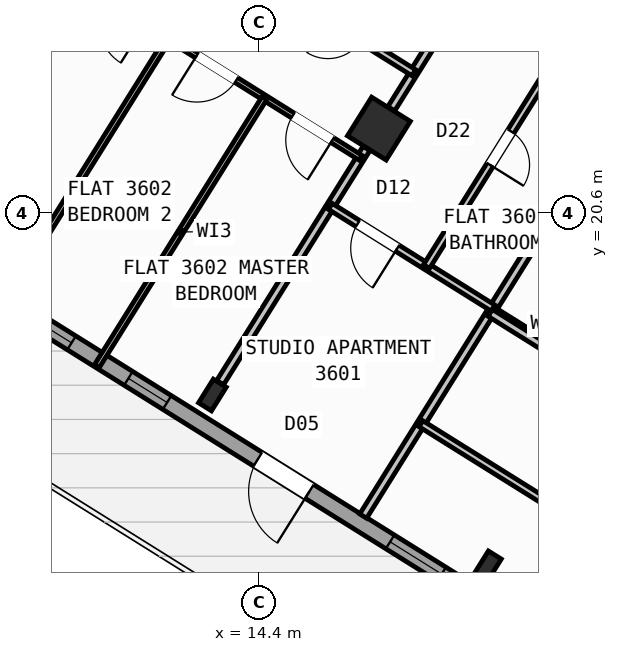
"""IFC4 building model, lengths in metres.
Left out: names, types, materials, properties, quantities, classifications, styles, units other than length and angle.
Written with IfcOpenShell. Run it as: python <this file> out.ifc"""

import sys

from ifc_helpers import new_model, si_unit, direction, frame, frame_2d, origin, origin_2d, place, context, subcontext, project, spatial, rectangle, hollow_rectangle, i_section, extrude, source, transform, mapped, element, fill, save


model = new_model("IFC4")
c1 = context("Model", 3, precision=1e-05, world=origin(), true_north=direction((0.0, 1.0)))
c2 = subcontext(c1, "Body", "Model", "MODEL_VIEW")
j1 = project(units=[si_unit("LENGTHUNIT", "METRE"), si_unit("PLANEANGLEUNIT", "RADIAN")], contexts=[c1])
p1 = place(None, origin())
s1 = spatial("IfcSite", under=j1, at=p1, CompositionType="ELEMENT")
p2 = place(p1, origin())
s2 = spatial("IfcBuilding", under=s1, at=p2, CompositionType="ELEMENT")
p3 = place(p2, frame((0.0, 0.0, 144.3)))
s3 = spatial("IfcBuildingStorey", under=s2, at=p3, CompositionType="ELEMENT", Elevation=144.3)
m1 = source(origin(), c2, "Body", "SweptSolid", [
    extrude(i_section(OverallWidth=0.3, OverallDepth=0.55, WebThickness=0.015, FlangeThickness=0.029, at=origin_2d()), origin(), (0.0, 0.0, 1.0), 3.6),
])
p4 = place(p3, frame((18.906, 13.612, 0.0), z_axis=(0.0, 0.0, 1.0), x_axis=(-0.848048096156, 0.529919264233, 0.0)))
e1 = element("IfcColumn", 1, at=p4, inside=s3, PredefinedType="COLUMN", context=c2, shape_type="MappedRepresentation", body=[
    mapped(m1, transform((0.0, 0.0, 0.0), scale=1.0)),
])
m2 = source(origin(), c2, "Body", "SweptSolid", [
    extrude(hollow_rectangle(XDim=0.9, YDim=0.9, WallThickness=0.036, at=origin_2d()), origin(), (0.0, 0.0, 1.0), 3.6),
])
p5 = place(p3, frame((16.764, 22.261, 0.0), z_axis=(0.0, 0.0, 1.0), x_axis=(-0.848048096156, 0.529919264233, 0.0)))
e2 = element("IfcColumn", 2, at=p5, inside=s3, PredefinedType="COLUMN", context=c2, shape_type="MappedRepresentation", body=[
    mapped(m2, transform((0.0, 0.0, 0.0), scale=1.0)),
])
p6 = place(p3, frame((13.478, 17.003, 0.0), z_axis=(0.0, 0.0, 1.0), x_axis=(-0.848048096156, 0.529919264233, 0.0)))
e3 = element("IfcColumn", 3, at=p6, inside=s3, PredefinedType="COLUMN", context=c2, shape_type="MappedRepresentation", body=[
    mapped(m1, transform((0.0, 0.0, 0.0), scale=1.0)),
])
p7 = place(p3, frame((29.268, 6.429, 0.0), z_axis=(0.0, 0.0, 1.0), x_axis=(-0.848049971435, 0.529916263149, 0.0)))
e4 = element("IfcWall", 4, at=p7, inside=s3, PredefinedType="STANDARD", context=c2, shape_type="SweptSolid", body=[
    extrude(rectangle(XDim=31.588, YDim=0.32, at=frame_2d((15.794, 0.0))), origin(), (0.0, 0.0, 1.0), 3.35),
])
p8 = place(p7, frame((16.362, 0.0, 0.0)))
e5 = element("IfcOpeningElement", 5, at=p8, cuts=e4, PredefinedType="OPENING", context=c2, shape_type="SweptSolid", body=[
    extrude(rectangle(XDim=1.2, YDim=2.15, at=frame_2d((0.6, 1.075))), frame((0.0, 0.17, 0.0), z_axis=(0.0, -1.0, 0.0), x_axis=(1.0, 0.0, 0.0)), (0.0, 0.0, 1.0), 0.34),
])
p9 = place(p7, frame((2.989, 0.0, 0.8)))
e6 = element("IfcOpeningElement", 6, at=p9, cuts=e4, PredefinedType="OPENING", context=c2, shape_type="SweptSolid", body=[
    extrude(rectangle(XDim=2.1, YDim=1.55, at=frame_2d((1.05, 0.775))), frame((0.0, 0.17, 0.0), z_axis=(0.0, -1.0, 0.0), x_axis=(1.0, 0.0, 0.0)), (0.0, 0.0, 1.0), 0.34),
])
p10 = place(p7, frame((8.359, 0.0, 0.8)))
e7 = element("IfcOpeningElement", 7, at=p10, cuts=e4, PredefinedType="OPENING", context=c2, shape_type="SweptSolid", body=[
    extrude(rectangle(XDim=2.1, YDim=1.55, at=frame_2d((1.05, 0.775))), frame((0.0, 0.17, 0.0), z_axis=(0.0, -1.0, 0.0), x_axis=(1.0, 0.0, 0.0)), (0.0, 0.0, 1.0), 0.34),
])
p11 = place(p7, frame((13.284, 0.0, 0.95)))
e8 = element("IfcOpeningElement", 8, at=p11, cuts=e4, PredefinedType="OPENING", context=c2, shape_type="SweptSolid", body=[
    extrude(rectangle(XDim=1.2, YDim=1.4, at=frame_2d((0.6, 0.7))), frame((0.0, 0.17, 0.0), z_axis=(0.0, -1.0, 0.0), x_axis=(1.0, 0.0, 0.0)), (0.0, 0.0, 1.0), 0.34),
])
p12 = place(p7, frame((29.188, 0.0, 0.95)))
e9 = element("IfcOpeningElement", 9, at=p12, cuts=e4, PredefinedType="OPENING", context=c2, shape_type="SweptSolid", body=[
    extrude(rectangle(XDim=1.2, YDim=1.4, at=frame_2d((0.6, 0.7))), frame((0.0, 0.17, 0.0), z_axis=(0.0, -1.0, 0.0), x_axis=(1.0, 0.0, 0.0)), (0.0, 0.0, 1.0), 0.34),
])
p13 = place(p7, frame((19.674, 0.0, 1.0)))
e10 = element("IfcOpeningElement", 10, at=p13, cuts=e4, PredefinedType="OPENING", context=c2, shape_type="SweptSolid", body=[
    extrude(rectangle(XDim=0.9, YDim=1.25, at=frame_2d((0.45, 0.625))), frame((0.0, 0.17, 0.0), z_axis=(0.0, -1.0, 0.0), x_axis=(1.0, 0.0, 0.0)), (0.0, 0.0, 1.0), 0.34),
])
p14 = place(p7, frame((21.896, 0.0, 1.0)))
e11 = element("IfcOpeningElement", 11, at=p14, cuts=e4, PredefinedType="OPENING", context=c2, shape_type="SweptSolid", body=[
    extrude(rectangle(XDim=0.9, YDim=1.25, at=frame_2d((0.45, 0.625))), frame((0.0, 0.17, 0.0), z_axis=(0.0, -1.0, 0.0), x_axis=(1.0, 0.0, 0.0)), (0.0, 0.0, 1.0), 0.34),
])
p15 = place(p7, frame((24.106, 0.0, 1.0)))
e12 = element("IfcOpeningElement", 12, at=p15, cuts=e4, PredefinedType="OPENING", context=c2, shape_type="SweptSolid", body=[
    extrude(rectangle(XDim=0.65, YDim=1.15, at=frame_2d((0.325, 0.575))), frame((0.0, 0.17, 0.0), z_axis=(0.0, -1.0, 0.0), x_axis=(1.0, 0.0, 0.0)), (0.0, 0.0, 1.0), 0.34),
])
p16 = place(p7, frame((26.366, 0.0, 1.0)))
e13 = element("IfcOpeningElement", 13, at=p16, cuts=e4, PredefinedType="OPENING", context=c2, shape_type="SweptSolid", body=[
    extrude(rectangle(XDim=0.9, YDim=1.25, at=frame_2d((0.45, 0.625))), frame((0.0, 0.17, 0.0), z_axis=(0.0, -1.0, 0.0), x_axis=(1.0, 0.0, 0.0)), (0.0, 0.0, 1.0), 0.34),
])
p17 = place(p3, frame((2.415, 23.452, 0.0), z_axis=(0.0, 0.0, 1.0), x_axis=(0.52991049553, 0.848053575387, 0.0)))
e14 = element("IfcWall", 14, at=p17, inside=s3, PredefinedType="STANDARD", context=c2, shape_type="SweptSolid", body=[
    extrude(rectangle(XDim=21.587, YDim=0.32, at=frame_2d((10.794, 0.0))), origin(), (0.0, 0.0, 1.0), 2.775),
])
p18 = place(p17, frame((2.356, 0.0, 0.8)))
e15 = element("IfcOpeningElement", 15, at=p18, cuts=e14, PredefinedType="OPENING", context=c2, shape_type="SweptSolid", body=[
    extrude(rectangle(XDim=2.1, YDim=1.55, at=frame_2d((1.05, 0.775))), frame((0.0, 0.17, 0.0), z_axis=(0.0, -1.0, 0.0), x_axis=(1.0, 0.0, 0.0)), (0.0, 0.0, 1.0), 0.34),
])
p19 = place(p17, frame((8.639, 0.0, 1.0)))
e16 = element("IfcOpeningElement", 16, at=p19, cuts=e14, PredefinedType="OPENING", context=c2, shape_type="SweptSolid", body=[
    extrude(rectangle(XDim=0.9, YDim=1.25, at=frame_2d((0.45, 0.625))), frame((0.0, 0.17, 0.0), z_axis=(0.0, -1.0, 0.0), x_axis=(1.0, 0.0, 0.0)), (0.0, 0.0, 1.0), 0.34),
])
p20 = place(p17, frame((17.744, 0.0, 0.85)))
e17 = element("IfcOpeningElement", 17, at=p20, cuts=e14, PredefinedType="OPENING", context=c2, shape_type="SweptSolid", body=[
    extrude(rectangle(XDim=1.5, YDim=1.5, at=frame_2d((0.75, 0.75))), frame((0.0, 0.17, 0.0), z_axis=(0.0, -1.0, 0.0), x_axis=(1.0, 0.0, 0.0)), (0.0, 0.0, 1.0), 0.34),
])
p21 = place(p3, frame((21.206, 17.292, 0.0), z_axis=(0.0, 0.0, 1.0), x_axis=(-0.848050851465, 0.529914854792, 0.0)))
e18 = element("IfcWall", 18, at=p21, inside=s3, PredefinedType="PARTITIONING", context=c2, shape_type="SweptSolid", body=[
    extrude(rectangle(XDim=2.61, YDim=0.16, at=frame_2d((1.305, 0.0))), origin(), (0.0, 0.0, 1.0), 3.34),
])
p22 = place(p3, frame((21.938, 23.391, 0.0), z_axis=(0.0, 0.0, 1.0), x_axis=(-0.529924725692, -0.848044683434, 0.0)))
e19 = element("IfcWall", 19, at=p22, inside=s3, PredefinedType="PARTITIONING", context=c2, shape_type="SweptSolid", body=[
    extrude(rectangle(XDim=10.35, YDim=0.16, at=frame_2d((5.175, 0.0))), origin(), (0.0, 0.0, 1.0), 3.34),
])
p23 = place(p3, frame((21.938, 23.391, 0.0), z_axis=(0.0, 0.0, 1.0), x_axis=(-0.848045850158, 0.529922858565, 0.0)))
e20 = element("IfcWall", 20, at=p23, inside=s3, PredefinedType="PARTITIONING", context=c2, shape_type="SweptSolid", body=[
    extrude(rectangle(XDim=16.73, YDim=0.16, at=frame_2d((8.365, 0.0))), origin(), (0.0, 0.0, 1.0), 3.34),
])
p24 = place(p23, frame((2.22, 0.0, 0.0)))
e21 = element("IfcOpeningElement", 21, at=p24, cuts=e20, PredefinedType="OPENING", context=c2, shape_type="SweptSolid", body=[
    extrude(rectangle(XDim=0.86, YDim=2.05, at=frame_2d((0.43, 1.025))), frame((0.0, 0.09, 0.0), z_axis=(0.0, -1.0, 0.0), x_axis=(1.0, 0.0, 0.0)), (0.0, 0.0, 1.0), 0.18),
])
p25 = place(p23, frame((14.22, 0.0, 0.0)))
e22 = element("IfcOpeningElement", 22, at=p25, cuts=e20, PredefinedType="OPENING", context=c2, shape_type="SweptSolid", body=[
    extrude(rectangle(XDim=1.0, YDim=2.1, at=frame_2d((0.5, 1.05))), frame((0.0, 0.09, 0.0), z_axis=(0.0, -1.0, 0.0), x_axis=(1.0, 0.0, 0.0)), (0.0, 0.0, 1.0), 0.18),
])
p26 = place(p3, frame((18.724, 25.399, 0.0), z_axis=(0.0, 0.0, 1.0), x_axis=(-0.529890499457, -0.848066069705, 0.0)))
e23 = element("IfcWall", 23, at=p26, inside=s3, PredefinedType="PARTITIONING", context=c2, shape_type="SweptSolid", body=[
    extrude(rectangle(XDim=3.238, YDim=0.16, at=frame_2d((1.619, 0.0))), origin(), (0.0, 0.0, 1.0), 2.775),
])
p27 = place(p3, frame((16.519, 21.87, 0.0), z_axis=(0.0, 0.0, 1.0), x_axis=(-0.529922447305, -0.848046107144, 0.0)))
e24 = element("IfcWall", 24, at=p27, inside=s3, PredefinedType="PARTITIONING", context=c2, shape_type="SweptSolid", body=[
    extrude(rectangle(XDim=5.451, YDim=0.16, at=frame_2d((2.726, 0.0))), origin(), (0.0, 0.0, 1.0), 2.775),
])
p28 = place(p3, frame((19.019, 18.718, 0.0), z_axis=(0.0, 0.0, 1.0), x_axis=(-0.848059820872, 0.529900500304, 0.0)))
e25 = element("IfcWall", 25, at=p28, inside=s3, PredefinedType="PLUMBINGWALL", context=c2, shape_type="SweptSolid", body=[
    extrude(rectangle(XDim=3.79, YDim=0.14, at=frame_2d((1.895, 0.0))), origin(), (0.0, 0.0, 1.0), 3.34),
])
p29 = place(p28, frame((2.23, 0.0, 0.0)))
e26 = element("IfcOpeningElement", 26, at=p29, cuts=e25, PredefinedType="OPENING", context=c2, shape_type="SweptSolid", body=[
    extrude(rectangle(XDim=0.92, YDim=2.08, at=frame_2d((0.46, 1.04))), frame((0.0, 0.08, 0.0), z_axis=(0.0, -1.0, 0.0), x_axis=(1.0, 0.0, 0.0)), (0.0, 0.0, 1.0), 0.16),
])
p30 = place(p3, frame((20.624, 24.212, 0.0), z_axis=(0.0, 0.0, 1.0), x_axis=(-0.529919283494, -0.848048084121, 0.0)))
e27 = element("IfcWall", 27, at=p30, inside=s3, PredefinedType="PLUMBINGWALL", context=c2, shape_type="SweptSolid", body=[
    extrude(rectangle(XDim=5.51, YDim=0.14, at=frame_2d((2.755, 0.0))), origin(), (0.0, 0.0, 1.0), 2.995),
])
p31 = place(p30, frame((2.365, 0.0, 0.0)))
e28 = element("IfcOpeningElement", 28, at=p31, cuts=e27, PredefinedType="OPENING", context=c2, shape_type="SweptSolid", body=[
    extrude(rectangle(XDim=0.78, YDim=2.05, at=frame_2d((0.39, 1.025))), frame((0.0, 0.08, 0.0), z_axis=(0.0, -1.0, 0.0), x_axis=(1.0, 0.0, 0.0)), (0.0, 0.0, 1.0), 0.16),
])
p32 = place(p3, frame((11.143, 30.136, 0.0), z_axis=(0.0, 0.0, 1.0), x_axis=(-0.529922479612, -0.848046086956, 0.0)))
e29 = element("IfcWall", 29, at=p32, inside=s3, PredefinedType="PARTITIONING", context=c2, shape_type="SweptSolid", body=[
    extrude(rectangle(XDim=10.62, YDim=0.11, at=frame_2d((5.31, 0.0))), origin(), (0.0, 0.0, 1.0), 3.34),
])
p33 = place(p32, frame((3.0, 0.0, 0.0)))
e30 = element("IfcOpeningElement", 30, at=p33, cuts=e29, PredefinedType="OPENING", context=c2, shape_type="SweptSolid", body=[
    extrude(rectangle(XDim=0.78, YDim=2.05, at=frame_2d((0.39, 1.025))), frame((0.0, 0.065, 0.0), z_axis=(0.0, -1.0, 0.0), x_axis=(1.0, 0.0, 0.0)), (0.0, 0.0, 1.0), 0.13),
])
p34 = place(p3, frame((17.452, 23.364, 0.0), z_axis=(0.0, 0.0, 1.0), x_axis=(-0.848044326704, 0.52992529657, 0.0)))
e31 = element("IfcWall", 31, at=p34, inside=s3, PredefinedType="PLUMBINGWALL", context=c2, shape_type="SweptSolid", body=[
    extrude(rectangle(XDim=8.94, YDim=0.14, at=frame_2d((4.47, 0.0))), origin(), (0.0, 0.0, 1.0), 3.34),
])
p35 = place(p34, frame((5.087, 0.0, 0.0)))
e32 = element("IfcOpeningElement", 32, at=p35, cuts=e31, PredefinedType="OPENING", context=c2, shape_type="SweptSolid", body=[
    extrude(rectangle(XDim=0.78, YDim=2.05, at=frame_2d((0.39, 1.025))), frame((0.0, 0.08, 0.0), z_axis=(0.0, -1.0, 0.0), x_axis=(1.0, 0.0, 0.0)), (0.0, 0.0, 1.0), 0.16),
])
p36 = place(p34, frame((1.218, 0.0, 0.0)))
e33 = element("IfcOpeningElement", 33, at=p36, cuts=e31, PredefinedType="OPENING", context=c2, shape_type="SweptSolid", body=[
    extrude(rectangle(XDim=0.78, YDim=2.05, at=frame_2d((0.39, 1.025))), frame((0.0, 0.08, 0.0), z_axis=(0.0, -1.0, 0.0), x_axis=(1.0, 0.0, 0.0)), (0.0, 0.0, 1.0), 0.16),
])
p37 = place(p3, frame((16.403, 21.685, 0.0), z_axis=(0.0, 0.0, 1.0), x_axis=(-0.848044326704, 0.52992529657, 0.0)))
e34 = element("IfcWall", 34, at=p37, inside=s3, PredefinedType="PARTITIONING", context=c2, shape_type="SweptSolid", body=[
    extrude(rectangle(XDim=8.94, YDim=0.11, at=frame_2d((4.47, 0.0))), origin(), (0.0, 0.0, 1.0), 3.34),
])
p38 = place(p37, frame((0.657, 0.0, 0.0)))
e35 = element("IfcOpeningElement", 35, at=p38, cuts=e34, PredefinedType="OPENING", context=c2, shape_type="SweptSolid", body=[
    extrude(rectangle(XDim=0.92, YDim=2.08, at=frame_2d((0.46, 1.04))), frame((0.0, 0.065, 0.0), z_axis=(0.0, -1.0, 0.0), x_axis=(1.0, 0.0, 0.0)), (0.0, 0.0, 1.0), 0.13),
])
p39 = place(p37, frame((2.893, 0.0, 0.0)))
e36 = element("IfcOpeningElement", 36, at=p39, cuts=e34, PredefinedType="OPENING", context=c2, shape_type="SweptSolid", body=[
    extrude(rectangle(XDim=0.92, YDim=2.08, at=frame_2d((0.46, 1.04))), frame((0.0, 0.065, 0.0), z_axis=(0.0, -1.0, 0.0), x_axis=(1.0, 0.0, 0.0)), (0.0, 0.0, 1.0), 0.13),
])
p40 = place(p37, frame((5.008, 0.0, 0.0)))
e37 = element("IfcOpeningElement", 37, at=p40, cuts=e34, PredefinedType="OPENING", context=c2, shape_type="SweptSolid", body=[
    extrude(rectangle(XDim=0.92, YDim=2.08, at=frame_2d((0.46, 1.04))), frame((0.0, 0.065, 0.0), z_axis=(0.0, -1.0, 0.0), x_axis=(1.0, 0.0, 0.0)), (0.0, 0.0, 1.0), 0.13),
])
p41 = place(p37, frame((7.363, 0.0, 0.0)))
e38 = element("IfcOpeningElement", 38, at=p41, cuts=e34, PredefinedType="OPENING", context=c2, shape_type="SweptSolid", body=[
    extrude(rectangle(XDim=0.92, YDim=2.08, at=frame_2d((0.46, 1.04))), frame((0.0, 0.065, 0.0), z_axis=(0.0, -1.0, 0.0), x_axis=(1.0, 0.0, 0.0)), (0.0, 0.0, 1.0), 0.13),
])
for number, where, z_axis, x_axis in (
    (39, (14.508, 22.869, 0.0), (0.0, 0.0, 1.0), (-0.53, -0.848, 0.0)),
    (40, (12.613, 24.053, 0.0), (0.0, 0.0, 1.0), (-0.53, -0.848, 0.0)),
):
    element("IfcWall", number, at=place(p3, frame(where, z_axis=z_axis, x_axis=x_axis)), inside=s3, PredefinedType="PARTITIONING", context=c2, shape_type="SweptSolid", body=[
        extrude(rectangle(XDim=6.24, YDim=0.11, at=frame_2d((3.12, 0.0))), origin(), (0.0, 0.0, 1.0), 2.995),
    ])
p42 = place(p3, frame((10.717, 25.238, 0.0), z_axis=(0.0, 0.0, 1.0), x_axis=(-0.52991804857, -0.848048855786, 0.0)))
e41 = element("IfcWall", 41, at=p42, inside=s3, PredefinedType="PARTITIONING", context=c2, shape_type="SweptSolid", body=[
    extrude(rectangle(XDim=6.24, YDim=0.11, at=frame_2d((3.12, 0.0))), origin(), (0.0, 0.0, 1.0), 3.34),
])
p43 = place(p3, frame((32.164, 10.374, 0.0), z_axis=(0.0, 0.0, 1.0), x_axis=(-0.848044107957, 0.529925646633, 0.0)))
e42 = element("IfcWall", 42, at=p43, inside=s3, PredefinedType="PARTITIONING", context=c2, shape_type="SweptSolid", body=[
    extrude(rectangle(XDim=15.57, YDim=0.16, at=frame_2d((7.785, 0.0))), origin(), (0.0, 0.0, 1.0), 3.34),
])
p44 = place(p43, frame((10.83, 0.0, 0.0)))
e43 = element("IfcOpeningElement", 43, at=p44, cuts=e42, PredefinedType="OPENING", context=c2, shape_type="SweptSolid", body=[
    extrude(rectangle(XDim=1.0, YDim=2.1, at=frame_2d((0.5, 1.05))), frame((0.0, 0.09, 0.0), z_axis=(0.0, -1.0, 0.0), x_axis=(1.0, 0.0, 0.0)), (0.0, 0.0, 1.0), 0.18),
])
p45 = place(p3, frame((29.72, 8.859, 0.0), z_axis=(0.0, 0.0, 1.0), x_axis=(-0.848049134363, 0.529917602752, 0.0)))
e44 = element("IfcWall", 44, at=p45, inside=s3, PredefinedType="PLUMBINGWALL", context=c2, shape_type="SweptSolid", body=[
    extrude(rectangle(XDim=14.3, YDim=0.14, at=frame_2d((7.15, 0.0))), origin(), (0.0, 0.0, 1.0), 3.34),
])
p46 = place(p45, frame((9.57, 0.0, 0.0)))
e45 = element("IfcOpeningElement", 45, at=p46, cuts=e44, PredefinedType="OPENING", context=c2, shape_type="SweptSolid", body=[
    extrude(rectangle(XDim=0.92, YDim=2.08, at=frame_2d((0.46, 1.04))), frame((0.0, 0.08, 0.0), z_axis=(0.0, -1.0, 0.0), x_axis=(1.0, 0.0, 0.0)), (0.0, 0.0, 1.0), 0.16),
])
m3 = source(origin(), c2, "Body", "SweptSolid", [
    extrude(rectangle(XDim=1.2, YDim=2.15, at=frame_2d((0.6, 1.075))), frame((0.0, 0.025, 0.0), z_axis=(0.0, -1.0, 0.0), x_axis=(1.0, 0.0, 0.0)), (0.0, 0.0, 1.0), 0.05),
])
p47 = place(p8, origin())
e46 = element("IfcDoor", 46, at=p47, inside=s3, OperationType="SINGLE_SWING_LEFT", PredefinedType="DOOR", context=c2, shape_type="MappedRepresentation", body=[
    mapped(m3, transform((0.0, 0.0, 0.0), scale=1.0)),
])
fill(e5, e46)
m4 = source(origin(), c2, "Body", "SweptSolid", [
    extrude(rectangle(XDim=1.2, YDim=1.4, at=frame_2d((0.6, 0.7))), frame((0.0, 0.03, 0.0), z_axis=(0.0, -1.0, 0.0), x_axis=(1.0, 0.0, 0.0)), (0.0, 0.0, 1.0), 0.06),
])
p48 = place(p11, origin())
e47 = element("IfcWindow", 47, at=p48, inside=s3, PartitioningType="SINGLE_PANEL", PredefinedType="WINDOW", context=c2, shape_type="MappedRepresentation", body=[
    mapped(m4, transform((0.0, 0.0, 0.0), scale=1.0)),
])
fill(e8, e47)
m5 = source(origin(), c2, "Body", "SweptSolid", [
    extrude(rectangle(XDim=0.9, YDim=1.25, at=frame_2d((0.45, 0.625))), frame((0.0, 0.03, 0.0), z_axis=(0.0, -1.0, 0.0), x_axis=(1.0, 0.0, 0.0)), (0.0, 0.0, 1.0), 0.06),
])
p49 = place(p13, origin())
e48 = element("IfcWindow", 48, at=p49, inside=s3, PartitioningType="SINGLE_PANEL", PredefinedType="WINDOW", context=c2, shape_type="MappedRepresentation", body=[
    mapped(m5, transform((0.0, 0.0, 0.0), scale=1.0)),
])
fill(e10, e48)
p50 = place(p14, origin())
e49 = element("IfcWindow", 49, at=p50, inside=s3, PartitioningType="SINGLE_PANEL", PredefinedType="WINDOW", context=c2, shape_type="MappedRepresentation", body=[
    mapped(m5, transform((0.0, 0.0, 0.0), scale=1.0)),
])
fill(e11, e49)
m6 = source(origin(), c2, "Body", "SweptSolid", [
    extrude(rectangle(XDim=0.92, YDim=2.08, at=frame_2d((0.46, 1.04))), frame((0.0, 0.025, 0.0), z_axis=(0.0, -1.0, 0.0), x_axis=(1.0, 0.0, 0.0)), (0.0, 0.0, 1.0), 0.05),
])
p51 = place(p29, origin())
e50 = element("IfcDoor", 50, at=p51, inside=s3, OperationType="SINGLE_SWING_LEFT", PredefinedType="DOOR", context=c2, shape_type="MappedRepresentation", body=[
    mapped(m6, transform((0.0, 0.0, 0.0), scale=1.0)),
])
fill(e26, e50)
m7 = source(origin(), c2, "Body", "SweptSolid", [
    extrude(rectangle(XDim=0.78, YDim=2.05, at=frame_2d((0.39, 1.025))), frame((0.0, 0.025, 0.0), z_axis=(0.0, -1.0, 0.0), x_axis=(1.0, 0.0, 0.0)), (0.0, 0.0, 1.0), 0.05),
])
p52 = place(p31, origin())
e51 = element("IfcDoor", 51, at=p52, inside=s3, OperationType="SINGLE_SWING_RIGHT", PredefinedType="DOOR", context=c2, shape_type="MappedRepresentation", body=[
    mapped(m7, transform((0.0, 0.0, 0.0), scale=1.0)),
])
fill(e28, e51)
p53 = place(p38, origin())
e52 = element("IfcDoor", 52, at=p53, inside=s3, OperationType="SINGLE_SWING_LEFT", PredefinedType="DOOR", context=c2, shape_type="MappedRepresentation", body=[
    mapped(m6, transform((0.0, 0.0, 0.0), scale=1.0)),
])
fill(e35, e52)
p54 = place(p39, origin())
e53 = element("IfcDoor", 53, at=p54, inside=s3, OperationType="SINGLE_SWING_RIGHT", PredefinedType="DOOR", context=c2, shape_type="MappedRepresentation", body=[
    mapped(m6, transform((0.0, 0.0, 0.0), scale=1.0)),
])
fill(e36, e53)
save(model, sys.argv[1])
